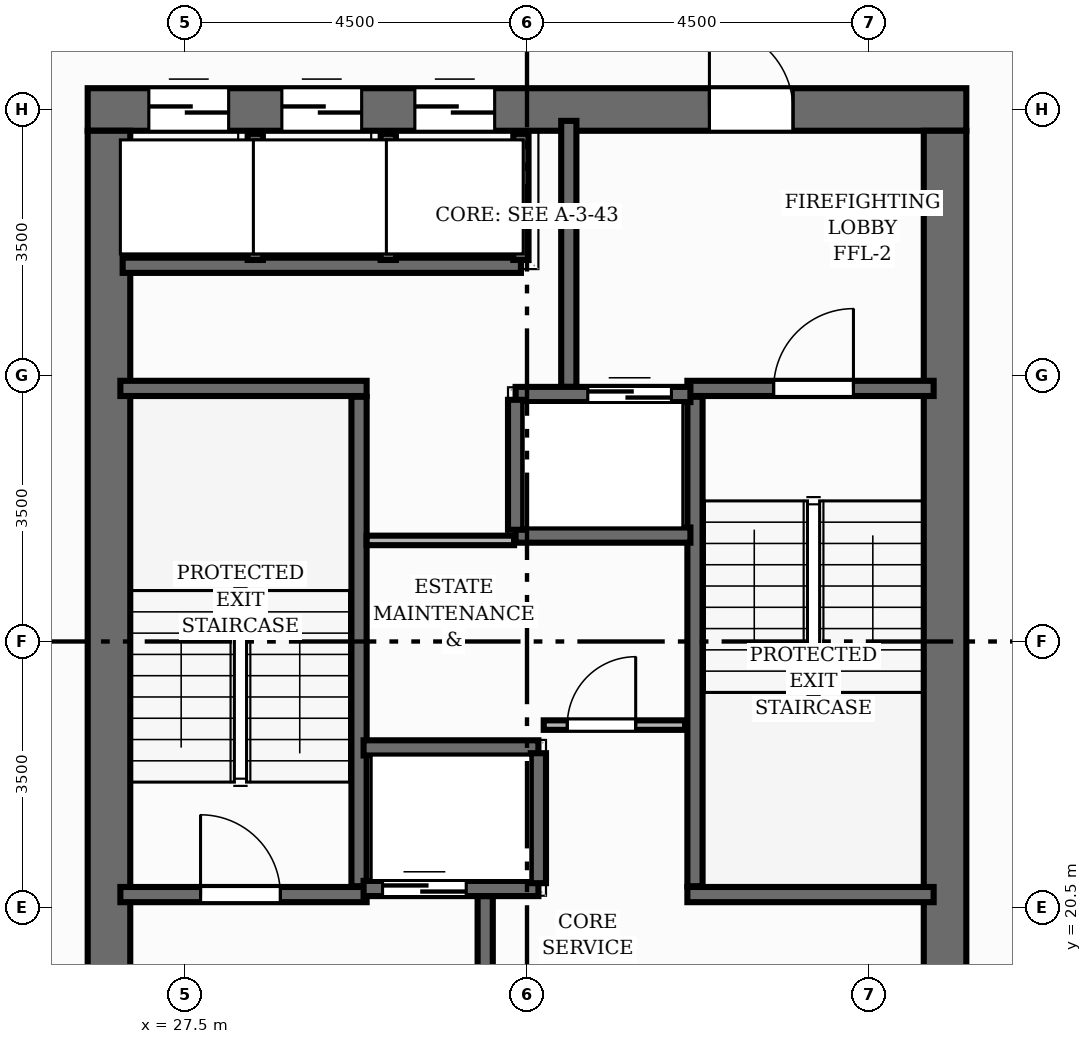
"""IFC4 building model, lengths in metres.
Left out: names, types, materials, properties, quantities, classifications, styles, units other than length and angle.
Written with IfcOpenShell. Run it as: python <this file> out.ifc"""

import sys

from ifc_helpers import new_model, si_unit, direction, frame, frame_2d, origin, place, context, subcontext, project, spatial, rectangle, extrude, element, fill, save


model = new_model("IFC4")
c1 = context("Model", 3, precision=1e-05, world=origin(), true_north=direction((0.0, 1.0)))
c2 = subcontext(c1, "Body", "Model", "MODEL_VIEW")
j1 = project(units=[si_unit("LENGTHUNIT", "METRE"), si_unit("PLANEANGLEUNIT", "RADIAN")], contexts=[c1])
p1 = place(None, origin())
s1 = spatial("IfcSite", under=j1, at=p1, CompositionType="ELEMENT")
p2 = place(p1, origin())
s2 = spatial("IfcBuilding", under=s1, at=p2, CompositionType="ELEMENT")
p3 = place(p2, frame((0.0, 0.0, 179.04)))
s3 = spatial("IfcBuildingStorey", under=s2, at=p3, CompositionType="ELEMENT", Elevation=179.04)
p4 = place(p3, frame((26.22, 31.0, 0.0), z_axis=(0.0, 0.0, 1.0), x_axis=(1.0, 0.0, 0.0)))
e1 = element("IfcWall", 1, at=p4, inside=s3, PredefinedType="SHEAR", context=c2, shape_type="SweptSolid", body=[
    extrude(rectangle(XDim=11.56, YDim=0.56, at=frame_2d((5.78, 0.0))), origin(), (0.0, 0.0, 1.0), 3.2),
])
p5 = place(p4, frame((8.18, 0.0, 0.0)))
e2 = element("IfcOpeningElement", 2, at=p5, cuts=e1, PredefinedType="OPENING", context=c2, shape_type="SweptSolid", body=[
    extrude(rectangle(XDim=1.1, YDim=2.15, at=frame_2d((0.55, 1.075))), frame((0.0, 0.29, 0.0), z_axis=(0.0, -1.0, 0.0), x_axis=(1.0, 0.0, 0.0)), (0.0, 0.0, 1.0), 0.58),
])
p6 = place(p4, frame((0.805, 0.0, 0.0)))
e3 = element("IfcOpeningElement", 3, at=p6, cuts=e1, PredefinedType="OPENING", context=c2, shape_type="SweptSolid", body=[
    extrude(rectangle(XDim=1.05, YDim=2.15, at=frame_2d((0.525, 1.075))), frame((0.0, 0.29, 0.0), z_axis=(0.0, -1.0, 0.0), x_axis=(1.0, 0.0, 0.0)), (0.0, 0.0, 1.0), 0.58),
])
p7 = place(p4, frame((2.555, 0.0, 0.0)))
e4 = element("IfcOpeningElement", 4, at=p7, cuts=e1, PredefinedType="OPENING", context=c2, shape_type="SweptSolid", body=[
    extrude(rectangle(XDim=1.05, YDim=2.15, at=frame_2d((0.525, 1.075))), frame((0.0, 0.29, 0.0), z_axis=(0.0, -1.0, 0.0), x_axis=(1.0, 0.0, 0.0)), (0.0, 0.0, 1.0), 0.58),
])
p8 = place(p4, frame((4.305, 0.0, 0.0)))
e5 = element("IfcOpeningElement", 5, at=p8, cuts=e1, PredefinedType="OPENING", context=c2, shape_type="SweptSolid", body=[
    extrude(rectangle(XDim=1.05, YDim=2.15, at=frame_2d((0.525, 1.075))), frame((0.0, 0.29, 0.0), z_axis=(0.0, -1.0, 0.0), x_axis=(1.0, 0.0, 0.0)), (0.0, 0.0, 1.0), 0.58),
])
for number, where, z_axis, x_axis in (
    (6, (26.5, 17.28, 0.0), (0.0, 0.0, 1.0), (0.0, 1.0, 0.0)),
    (7, (37.5, 17.28, 0.0), (0.0, 0.0, 1.0), (0.0, 1.0, 0.0)),
):
    element("IfcWall", number, at=place(p3, frame(where, z_axis=z_axis, x_axis=x_axis)), inside=s3, PredefinedType="SHEAR", context=c2, shape_type="SweptSolid", body=[
        extrude(rectangle(XDim=13.44, YDim=0.56, at=frame_2d((6.72, 0.0))), origin(), (0.0, 0.0, 1.0), 3.2),
    ])
p9 = place(p3, frame((29.79, 20.78, 0.0), z_axis=(0.0, 0.0, 1.0), x_axis=(0.0, 1.0, 0.0)))
e8 = element("IfcWall", 8, at=p9, inside=s3, PredefinedType="SHEAR", context=c2, shape_type="SweptSolid", body=[
    extrude(rectangle(XDim=6.44, YDim=0.2, at=frame_2d((3.22, 0.0))), origin(), (0.0, 0.0, 1.0), 3.2),
])
p10 = place(p3, frame((26.65, 27.33, 0.0), z_axis=(0.0, 0.0, 1.0), x_axis=(1.0, 0.0, 0.0)))
e9 = element("IfcWall", 9, at=p10, inside=s3, PredefinedType="SHEAR", context=c2, shape_type="SweptSolid", body=[
    extrude(rectangle(XDim=3.24, YDim=0.2, at=frame_2d((1.62, 0.0))), origin(), (0.0, 0.0, 1.0), 3.2),
])
p11 = place(p3, frame((26.65, 20.67, 0.0), z_axis=(0.0, 0.0, 1.0), x_axis=(1.0, 0.0, 0.0)))
e10 = element("IfcWall", 10, at=p11, inside=s3, PredefinedType="SHEAR", context=c2, shape_type="SweptSolid", body=[
    extrude(rectangle(XDim=3.24, YDim=0.2, at=frame_2d((1.62, 0.0))), origin(), (0.0, 0.0, 1.0), 3.2),
])
p12 = place(p11, frame((1.055, 0.0, 0.0)))
e11 = element("IfcOpeningElement", 11, at=p12, cuts=e10, PredefinedType="OPENING", context=c2, shape_type="SweptSolid", body=[
    extrude(rectangle(XDim=1.05, YDim=2.15, at=frame_2d((0.525, 1.075))), frame((0.0, 0.11, 0.0), z_axis=(0.0, -1.0, 0.0), x_axis=(1.0, 0.0, 0.0)), (0.0, 0.0, 1.0), 0.22),
])
p13 = place(p3, frame((34.21, 20.78, 0.0), z_axis=(0.0, 0.0, 1.0), x_axis=(0.0, 1.0, 0.0)))
e12 = element("IfcWall", 12, at=p13, inside=s3, PredefinedType="SHEAR", context=c2, shape_type="SweptSolid", body=[
    extrude(rectangle(XDim=6.44, YDim=0.2, at=frame_2d((3.22, 0.0))), origin(), (0.0, 0.0, 1.0), 3.2),
])
p14 = place(p3, frame((34.11, 20.67, 0.0), z_axis=(0.0, 0.0, 1.0), x_axis=(1.0, 0.0, 0.0)))
e13 = element("IfcWall", 13, at=p14, inside=s3, PredefinedType="SHEAR", context=c2, shape_type="SweptSolid", body=[
    extrude(rectangle(XDim=3.24, YDim=0.2, at=frame_2d((1.62, 0.0))), origin(), (0.0, 0.0, 1.0), 3.2),
])
p15 = place(p3, frame((34.11, 27.33, 0.0), z_axis=(0.0, 0.0, 1.0), x_axis=(1.0, 0.0, 0.0)))
e14 = element("IfcWall", 14, at=p15, inside=s3, PredefinedType="SHEAR", context=c2, shape_type="SweptSolid", body=[
    extrude(rectangle(XDim=3.24, YDim=0.2, at=frame_2d((1.62, 0.0))), origin(), (0.0, 0.0, 1.0), 3.2),
])
p16 = place(p15, frame((1.135, 0.0, 0.0)))
e15 = element("IfcOpeningElement", 15, at=p16, cuts=e14, PredefinedType="OPENING", context=c2, shape_type="SweptSolid", body=[
    extrude(rectangle(XDim=1.05, YDim=2.15, at=frame_2d((0.525, 1.075))), frame((0.0, 0.11, 0.0), z_axis=(0.0, -1.0, 0.0), x_axis=(1.0, 0.0, 0.0)), (0.0, 0.0, 1.0), 0.22),
])
for number, where, z_axis, x_axis in (
    (16, (31.45, 17.15, 0.0), (0.0, 0.0, 1.0), (0.0, 1.0, 0.0)),
    (17, (32.55, 27.35, 0.0), (0.0, 0.0, 1.0), (0.0, 1.0, 0.0)),
):
    element("IfcWall", number, at=place(p3, frame(where, z_axis=z_axis, x_axis=x_axis)), inside=s3, PredefinedType="SHEAR", context=c2, shape_type="SweptSolid", body=[
        extrude(rectangle(XDim=3.5, YDim=0.2, at=frame_2d((1.75, 0.0))), origin(), (0.0, 0.0, 1.0), 3.2),
    ])
p17 = place(p3, frame((29.85, 20.75, 0.0), z_axis=(0.0, 0.0, 1.0), x_axis=(1.0, 0.0, 0.0)))
e18 = element("IfcWall", 18, at=p17, inside=s3, PredefinedType="SHEAR", context=c2, shape_type="SweptSolid", body=[
    extrude(rectangle(XDim=2.3, YDim=0.2, at=frame_2d((1.15, 0.0))), origin(), (0.0, 0.0, 1.0), 3.2),
])
p18 = place(p17, frame((0.25, 0.0, 0.0)))
e19 = element("IfcOpeningElement", 19, at=p18, cuts=e18, PredefinedType="OPENING", context=c2, shape_type="SweptSolid", body=[
    extrude(rectangle(XDim=1.1, YDim=2.15, at=frame_2d((0.55, 1.075))), frame((0.0, 0.11, 0.0), z_axis=(0.0, -1.0, 0.0), x_axis=(1.0, 0.0, 0.0)), (0.0, 0.0, 1.0), 0.22),
])
p19 = place(p3, frame((29.85, 22.6, 0.0), z_axis=(0.0, 0.0, 1.0), x_axis=(1.0, 0.0, 0.0)))
e20 = element("IfcWall", 20, at=p19, inside=s3, PredefinedType="SHEAR", context=c2, shape_type="SweptSolid", body=[
    extrude(rectangle(XDim=2.3, YDim=0.2, at=frame_2d((1.15, 0.0))), origin(), (0.0, 0.0, 1.0), 3.2),
])
p20 = place(p3, frame((32.15, 20.82, 0.0), z_axis=(0.0, 0.0, 1.0), x_axis=(0.0, 1.0, 0.0)))
e21 = element("IfcWall", 21, at=p20, inside=s3, PredefinedType="SHEAR", context=c2, shape_type="SweptSolid", body=[
    extrude(rectangle(XDim=1.71, YDim=0.2, at=frame_2d((0.855, 0.0))), origin(), (0.0, 0.0, 1.0), 3.2),
])
p21 = place(p3, frame((31.85, 27.25, 0.0), z_axis=(0.0, 0.0, 1.0), x_axis=(1.0, 0.0, 0.0)))
e22 = element("IfcWall", 22, at=p21, inside=s3, PredefinedType="SHEAR", context=c2, shape_type="SweptSolid", body=[
    extrude(rectangle(XDim=2.3, YDim=0.2, at=frame_2d((1.15, 0.0))), origin(), (0.0, 0.0, 1.0), 3.2),
])
p22 = place(p21, frame((0.95, 0.0, 0.0)))
e23 = element("IfcOpeningElement", 23, at=p22, cuts=e22, PredefinedType="OPENING", context=c2, shape_type="SweptSolid", body=[
    extrude(rectangle(XDim=1.1, YDim=2.15, at=frame_2d((0.55, 1.075))), frame((0.0, 0.11, 0.0), z_axis=(0.0, -1.0, 0.0), x_axis=(1.0, 0.0, 0.0)), (0.0, 0.0, 1.0), 0.22),
])
p23 = place(p3, frame((31.85, 25.4, 0.0), z_axis=(0.0, 0.0, 1.0), x_axis=(1.0, 0.0, 0.0)))
e24 = element("IfcWall", 24, at=p23, inside=s3, PredefinedType="SHEAR", context=c2, shape_type="SweptSolid", body=[
    extrude(rectangle(XDim=2.3, YDim=0.2, at=frame_2d((1.15, 0.0))), origin(), (0.0, 0.0, 1.0), 3.2),
])
p24 = place(p3, frame((31.85, 25.47, 0.0), z_axis=(0.0, 0.0, 1.0), x_axis=(0.0, 1.0, 0.0)))
e25 = element("IfcWall", 25, at=p24, inside=s3, PredefinedType="SHEAR", context=c2, shape_type="SweptSolid", body=[
    extrude(rectangle(XDim=1.71, YDim=0.2, at=frame_2d((0.855, 0.0))), origin(), (0.0, 0.0, 1.0), 3.2),
])
p25 = place(p3, frame((26.68, 28.95, 0.0), z_axis=(0.0, 0.0, 1.0), x_axis=(1.0, 0.0, 0.0)))
e26 = element("IfcWall", 26, at=p25, inside=s3, PredefinedType="SHEAR", context=c2, shape_type="SweptSolid", body=[
    extrude(rectangle(XDim=5.24, YDim=0.2, at=frame_2d((2.62, 0.0))), origin(), (0.0, 0.0, 1.0), 3.2),
])
for number, where, z_axis, x_axis in (
    (27, (31.92, 29.02, 0.0), (0.0, 0.0, 1.0), (0.0, 1.0, 0.0)),
    (28, (28.425, 29.02, 0.0), (0.0, 0.0, 1.0), (0.0, 1.0, 0.0)),
    (29, (30.175, 29.02, 0.0), (0.0, 0.0, 1.0), (0.0, 1.0, 0.0)),
):
    element("IfcWall", number, at=place(p3, frame(where, z_axis=z_axis, x_axis=x_axis)), inside=s3, PredefinedType="SHEAR", context=c2, shape_type="SweptSolid", body=[
        extrude(rectangle(XDim=1.66, YDim=0.2, at=frame_2d((0.83, 0.0))), origin(), (0.0, 0.0, 1.0), 3.2),
    ])
p26 = place(p3, frame((32.22, 22.9, 0.0), z_axis=(0.0, 0.0, 1.0), x_axis=(1.0, 0.0, 0.0)))
e30 = element("IfcWall", 30, at=p26, inside=s3, PredefinedType="PARTITIONING", context=c2, shape_type="SweptSolid", body=[
    extrude(rectangle(XDim=1.86, YDim=0.125, at=frame_2d((0.93, 0.0))), origin(), (0.0, 0.0, 1.0), 2.955),
])
p27 = place(p26, frame((0.31, 0.0, 0.0)))
e31 = element("IfcOpeningElement", 31, at=p27, cuts=e30, PredefinedType="OPENING", context=c2, shape_type="SweptSolid", body=[
    extrude(rectangle(XDim=0.9, YDim=2.1, at=frame_2d((0.45, 1.05))), frame((0.0, 0.073, 0.0), z_axis=(0.0, -1.0, 0.0), x_axis=(1.0, 0.0, 0.0)), (0.0, 0.0, 1.0), 0.145),
])
p28 = place(p3, frame((29.89, 25.33, 0.0), z_axis=(0.0, 0.0, 1.0), x_axis=(1.0, 0.0, 0.0)))
e32 = element("IfcWall", 32, at=p28, inside=s3, PredefinedType="PARTITIONING", context=c2, shape_type="SweptSolid", body=[
    extrude(rectangle(XDim=1.94, YDim=0.125, at=frame_2d((0.97, 0.0))), origin(), (0.0, 0.0, 1.0), 2.955),
])
p29 = place(p12, origin())
e33 = element("IfcDoor", 33, at=p29, inside=s3, OperationType="SINGLE_SWING_LEFT", PredefinedType="DOOR", context=c2, shape_type="SweptSolid", body=[
    extrude(rectangle(XDim=1.05, YDim=2.15, at=frame_2d((0.525, 1.075))), frame((0.0, 0.025, 0.0), z_axis=(0.0, -1.0, 0.0), x_axis=(1.0, 0.0, 0.0)), (0.0, 0.0, 1.0), 0.05),
])
fill(e11, e33)
p30 = place(p16, origin())
e34 = element("IfcDoor", 34, at=p30, inside=s3, OperationType="SINGLE_SWING_RIGHT", PredefinedType="DOOR", context=c2, shape_type="SweptSolid", body=[
    extrude(rectangle(XDim=1.05, YDim=2.15, at=frame_2d((0.525, 1.075))), frame((0.0, 0.025, 0.0), z_axis=(0.0, -1.0, 0.0), x_axis=(1.0, 0.0, 0.0)), (0.0, 0.0, 1.0), 0.05),
])
fill(e15, e34)
p31 = place(p5, origin())
e35 = element("IfcDoor", 35, at=p31, inside=s3, OperationType="SINGLE_SWING_LEFT", PredefinedType="DOOR", context=c2, shape_type="SweptSolid", body=[
    extrude(rectangle(XDim=1.1, YDim=2.15, at=frame_2d((0.55, 1.075))), frame((0.0, 0.025, 0.0), z_axis=(0.0, -1.0, 0.0), x_axis=(1.0, 0.0, 0.0)), (0.0, 0.0, 1.0), 0.05),
])
fill(e2, e35)
p32 = place(p18, origin())
e36 = element("IfcDoor", 36, at=p32, inside=s3, OperationType="DOUBLE_DOOR_SLIDING", PredefinedType="DOOR", context=c2, shape_type="SweptSolid", body=[
    extrude(rectangle(XDim=1.1, YDim=2.15, at=frame_2d((0.55, 1.075))), frame((0.0, 0.025, 0.0), z_axis=(0.0, -1.0, 0.0), x_axis=(1.0, 0.0, 0.0)), (0.0, 0.0, 1.0), 0.05),
])
fill(e19, e36)
p33 = place(p22, origin())
e37 = element("IfcDoor", 37, at=p33, inside=s3, OperationType="DOUBLE_DOOR_SLIDING", PredefinedType="DOOR", context=c2, shape_type="SweptSolid", body=[
    extrude(rectangle(XDim=1.1, YDim=2.15, at=frame_2d((0.55, 1.075))), frame((0.0, 0.025, 0.0), z_axis=(0.0, -1.0, 0.0), x_axis=(1.0, 0.0, 0.0)), (0.0, 0.0, 1.0), 0.05),
])
fill(e23, e37)
p34 = place(p6, origin())
e38 = element("IfcDoor", 38, at=p34, inside=s3, OperationType="DOUBLE_DOOR_SLIDING", PredefinedType="DOOR", context=c2, shape_type="SweptSolid", body=[
    extrude(rectangle(XDim=1.05, YDim=2.15, at=frame_2d((0.525, 1.075))), frame((0.0, 0.025, 0.0), z_axis=(0.0, -1.0, 0.0), x_axis=(1.0, 0.0, 0.0)), (0.0, 0.0, 1.0), 0.05),
])
fill(e3, e38)
p35 = place(p7, origin())
e39 = element("IfcDoor", 39, at=p35, inside=s3, OperationType="DOUBLE_DOOR_SLIDING", PredefinedType="DOOR", context=c2, shape_type="SweptSolid", body=[
    extrude(rectangle(XDim=1.05, YDim=2.15, at=frame_2d((0.525, 1.075))), frame((0.0, 0.025, 0.0), z_axis=(0.0, -1.0, 0.0), x_axis=(1.0, 0.0, 0.0)), (0.0, 0.0, 1.0), 0.05),
])
fill(e4, e39)
p36 = place(p8, origin())
e40 = element("IfcDoor", 40, at=p36, inside=s3, OperationType="DOUBLE_DOOR_SLIDING", PredefinedType="DOOR", context=c2, shape_type="SweptSolid", body=[
    extrude(rectangle(XDim=1.05, YDim=2.15, at=frame_2d((0.525, 1.075))), frame((0.0, 0.025, 0.0), z_axis=(0.0, -1.0, 0.0), x_axis=(1.0, 0.0, 0.0)), (0.0, 0.0, 1.0), 0.05),
])
fill(e5, e40)
p37 = place(p27, origin())
e41 = element("IfcDoor", 41, at=p37, inside=s3, OperationType="SINGLE_SWING_RIGHT", PredefinedType="DOOR", context=c2, shape_type="SweptSolid", body=[
    extrude(rectangle(XDim=0.9, YDim=2.1, at=frame_2d((0.45, 1.05))), frame((0.0, 0.025, 0.0), z_axis=(0.0, -1.0, 0.0), x_axis=(1.0, 0.0, 0.0)), (0.0, 0.0, 1.0), 0.05),
])
fill(e31, e41)
save(model, sys.argv[1])
